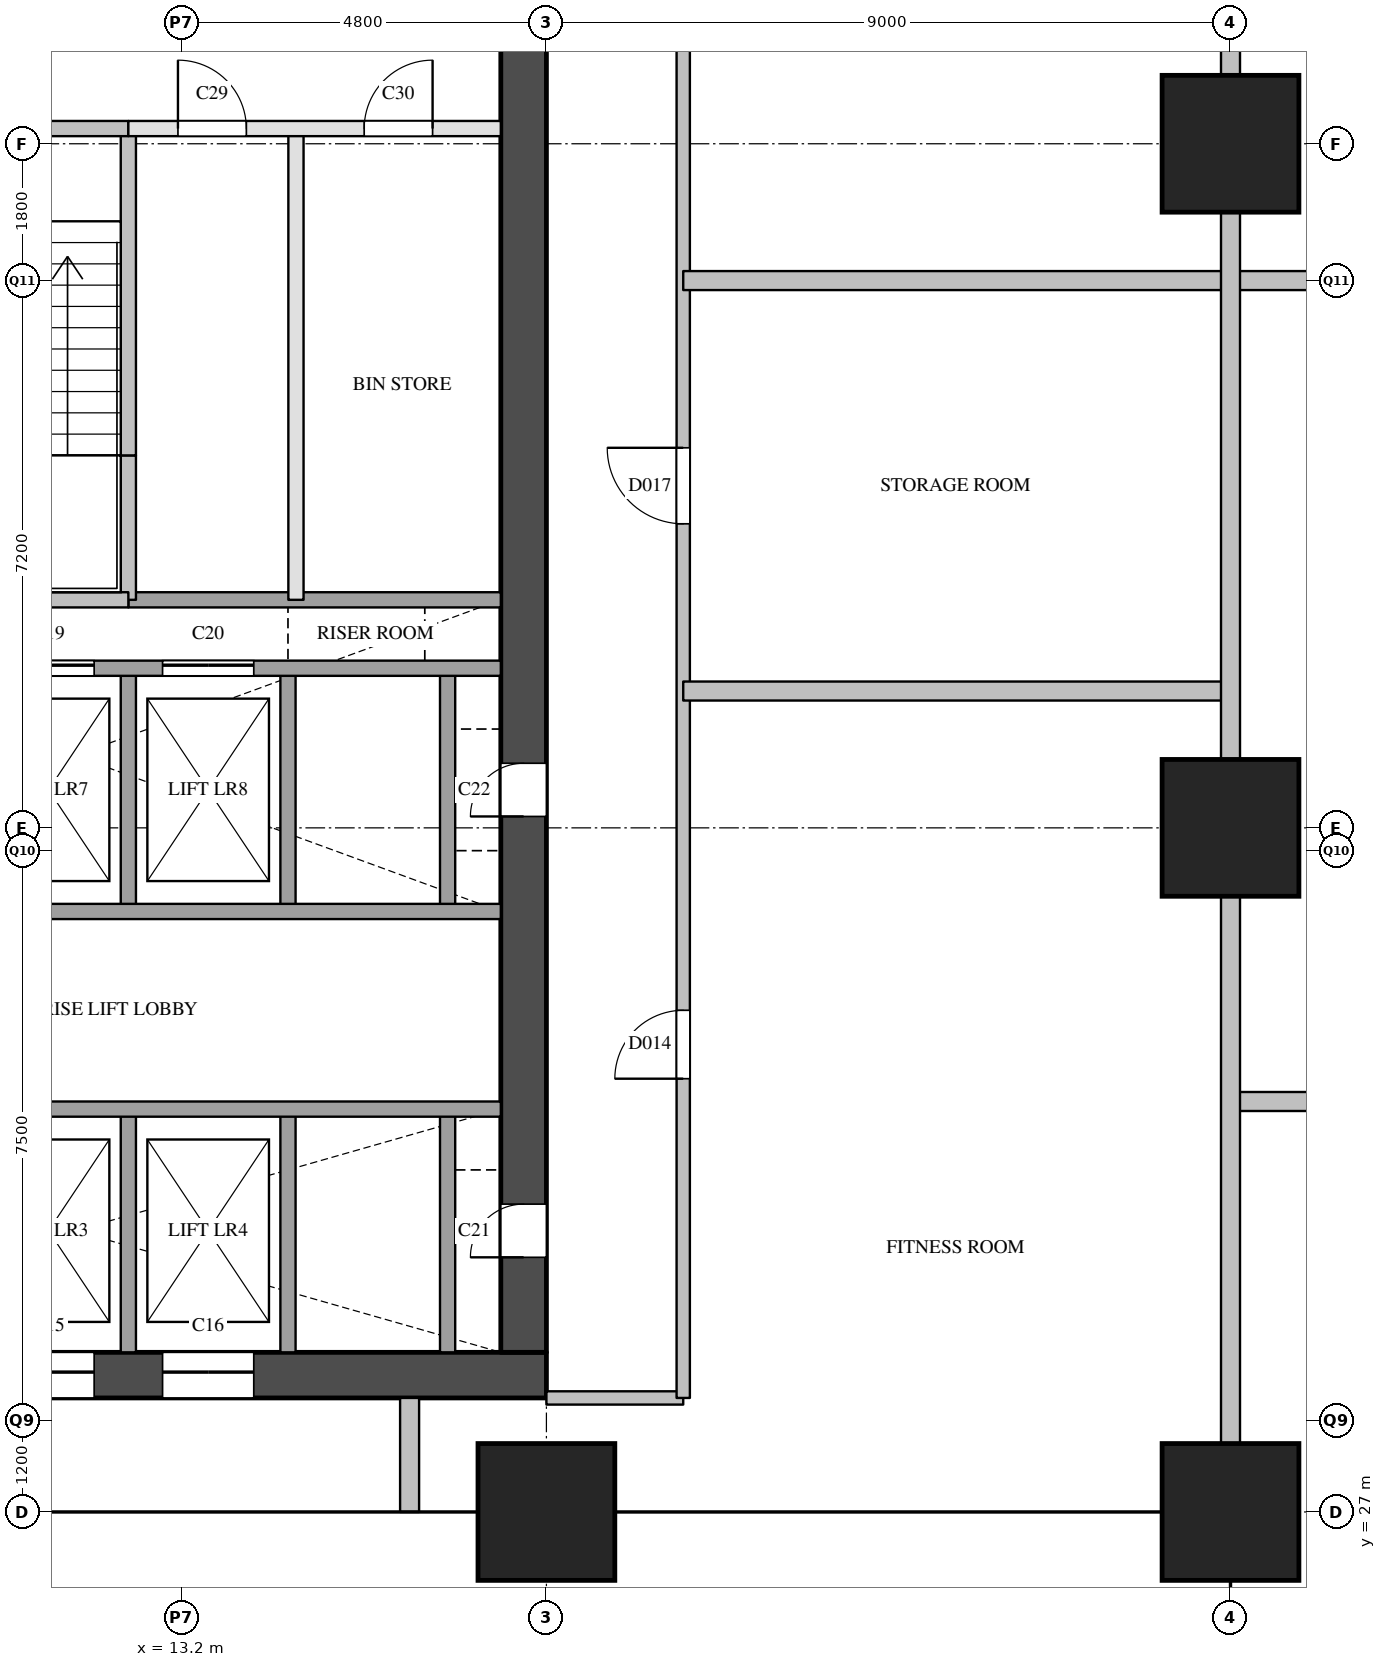
"""IFC4 building model, lengths in metres.
Left out: names, types, materials, properties, quantities, classifications, styles, units other than length and angle.
Written with IfcOpenShell. Run it as: python <this file> out.ifc"""

import sys

from ifc_helpers import new_model, si_unit, direction, frame, frame_2d, origin, origin_2d, place, context, subcontext, project, spatial, rectangle, extrude, element, fill, save


model = new_model("IFC4")
c1 = context("Model", 3, precision=1e-05, world=origin(), true_north=direction((0.0, 1.0)))
c2 = subcontext(c1, "Body", "Model", "MODEL_VIEW")
j1 = project(units=[si_unit("LENGTHUNIT", "METRE"), si_unit("PLANEANGLEUNIT", "RADIAN")], contexts=[c1])
p1 = place(None, origin())
s1 = spatial("IfcSite", under=j1, at=p1, CompositionType="ELEMENT")
p2 = place(p1, origin())
s2 = spatial("IfcBuilding", under=s1, at=p2, CompositionType="ELEMENT")
p3 = place(p2, frame((0.0, 0.0, 89.2)))
s3 = spatial("IfcBuildingStorey", under=s2, at=p3, CompositionType="ELEMENT", Elevation=89.2)
for number, where, z_axis, x_axis in (
    (1, (18.0, 27.0, 0.0), (0.0, 0.0, 1.0), (1.0, 0.0, 0.0)),
    (2, (27.0, 27.0, 0.0), (0.0, 0.0, 1.0), (1.0, 0.0, 0.0)),
    (3, (27.0, 36.0, 0.0), (0.0, 0.0, 1.0), (1.0, 0.0, 0.0)),
    (4, (27.0, 45.0, 0.0), (0.0, 0.0, 1.0), (1.0, 0.0, 0.0)),
):
    element("IfcColumn", number, at=place(p3, frame(where, z_axis=z_axis, x_axis=x_axis)), inside=s3, PredefinedType="COLUMN", context=c2, shape_type="SweptSolid", body=[
        extrude(rectangle(XDim=1.8, YDim=1.8, at=origin_2d()), origin(), (0.0, 0.0, 1.0), 3.8),
    ])
p4 = place(p3, frame((5.6, 28.8, 0.0), z_axis=(0.0, 0.0, 1.0), x_axis=(1.0, 0.0, 0.0)))
e5 = element("IfcWall", 5, at=p4, inside=s3, PredefinedType="SHEAR", context=c2, shape_type="SweptSolid", body=[
    extrude(rectangle(XDim=12.4, YDim=0.6, at=frame_2d((6.2, 0.0))), origin(), (0.0, 0.0, 1.0), 3.5),
])
p5 = place(p4, frame((1.05, 0.0, 0.0)))
e6 = element("IfcOpeningElement", 6, at=p5, cuts=e5, PredefinedType="OPENING", context=c2, shape_type="SweptSolid", body=[
    extrude(rectangle(XDim=1.2, YDim=2.1, at=frame_2d((0.6, 1.05))), frame((0.0, 0.31, 0.0), z_axis=(0.0, -1.0, 0.0), x_axis=(1.0, 0.0, 0.0)), (0.0, 0.0, 1.0), 0.62),
])
p6 = place(p4, frame((5.25, 0.0, 0.0)))
e7 = element("IfcOpeningElement", 7, at=p6, cuts=e5, PredefinedType="OPENING", context=c2, shape_type="SweptSolid", body=[
    extrude(rectangle(XDim=1.2, YDim=2.1, at=frame_2d((0.6, 1.05))), frame((0.0, 0.31, 0.0), z_axis=(0.0, -1.0, 0.0), x_axis=(1.0, 0.0, 0.0)), (0.0, 0.0, 1.0), 0.62),
])
p7 = place(p4, frame((7.35, 0.0, 0.0)))
e8 = element("IfcOpeningElement", 8, at=p7, cuts=e5, PredefinedType="OPENING", context=c2, shape_type="SweptSolid", body=[
    extrude(rectangle(XDim=1.2, YDim=2.1, at=frame_2d((0.6, 1.05))), frame((0.0, 0.31, 0.0), z_axis=(0.0, -1.0, 0.0), x_axis=(1.0, 0.0, 0.0)), (0.0, 0.0, 1.0), 0.62),
])
p8 = place(p3, frame((17.7, 29.1, 0.0), z_axis=(0.0, 0.0, 1.0), x_axis=(0.0, 1.0, 0.0)))
e9 = element("IfcWall", 9, at=p8, inside=s3, PredefinedType="SHEAR", context=c2, shape_type="SweptSolid", body=[
    extrude(rectangle(XDim=20.3, YDim=0.6, at=frame_2d((10.15, 0.0))), origin(), (0.0, 0.0, 1.0), 3.5),
])
p9 = place(p8, frame((1.25, 0.0, 0.0)))
e10 = element("IfcOpeningElement", 10, at=p9, cuts=e9, PredefinedType="OPENING", context=c2, shape_type="SweptSolid", body=[
    extrude(rectangle(XDim=0.7, YDim=2.1, at=frame_2d((0.35, 1.05))), frame((0.0, 0.31, 0.0), z_axis=(0.0, -1.0, 0.0), x_axis=(1.0, 0.0, 0.0)), (0.0, 0.0, 1.0), 0.62),
])
p10 = place(p8, frame((7.05, 0.0, 0.0)))
e11 = element("IfcOpeningElement", 11, at=p10, cuts=e9, PredefinedType="OPENING", context=c2, shape_type="SweptSolid", body=[
    extrude(rectangle(XDim=0.7, YDim=2.1, at=frame_2d((0.35, 1.05))), frame((0.0, 0.31, 0.0), z_axis=(0.0, -1.0, 0.0), x_axis=(1.0, 0.0, 0.0)), (0.0, 0.0, 1.0), 0.62),
])
p11 = place(p3, frame((12.5, 29.1, 0.0), z_axis=(0.0, 0.0, 1.0), x_axis=(0.0, 1.0, 0.0)))
e12 = element("IfcWall", 12, at=p11, inside=s3, PredefinedType="SOLIDWALL", context=c2, shape_type="SweptSolid", body=[
    extrude(rectangle(XDim=3.2, YDim=0.2, at=frame_2d((1.6, 0.0))), origin(), (0.0, 0.0, 1.0), 3.5),
])
p12 = place(p3, frame((12.5, 34.9, 0.0), z_axis=(0.0, 0.0, 1.0), x_axis=(0.0, 1.0, 0.0)))
e13 = element("IfcWall", 13, at=p12, inside=s3, PredefinedType="SOLIDWALL", context=c2, shape_type="SweptSolid", body=[
    extrude(rectangle(XDim=3.2, YDim=0.2, at=frame_2d((1.6, 0.0))), origin(), (0.0, 0.0, 1.0), 3.5),
])
p13 = place(p3, frame((12.5, 39.0, 0.0), z_axis=(0.0, 0.0, 1.0), x_axis=(0.0, 1.0, 0.0)))
e14 = element("IfcWall", 14, at=p13, inside=s3, PredefinedType="SOLIDWALL", context=c2, shape_type="SweptSolid", body=[
    extrude(rectangle(XDim=1.9, YDim=0.2, at=frame_2d((0.95, 0.0))), origin(), (0.0, 0.0, 1.0), 3.5),
])
p14 = place(p3, frame((12.5, 40.9, 0.0), z_axis=(0.0, 0.0, 1.0), x_axis=(0.0, 1.0, 0.0)))
e15 = element("IfcWall", 15, at=p14, inside=s3, PredefinedType="SOLIDWALL", context=c2, shape_type="SweptSolid", body=[
    extrude(rectangle(XDim=4.3, YDim=0.2, at=frame_2d((2.15, 0.0))), origin(), (0.0, 0.0, 1.0), 3.5),
])
p15 = place(p3, frame((14.6, 29.1, 0.0), z_axis=(0.0, 0.0, 1.0), x_axis=(0.0, 1.0, 0.0)))
e16 = element("IfcWall", 16, at=p15, inside=s3, PredefinedType="SOLIDWALL", context=c2, shape_type="SweptSolid", body=[
    extrude(rectangle(XDim=3.2, YDim=0.2, at=frame_2d((1.6, 0.0))), origin(), (0.0, 0.0, 1.0), 3.5),
])
p16 = place(p3, frame((14.6, 34.9, 0.0), z_axis=(0.0, 0.0, 1.0), x_axis=(0.0, 1.0, 0.0)))
e17 = element("IfcWall", 17, at=p16, inside=s3, PredefinedType="SOLIDWALL", context=c2, shape_type="SweptSolid", body=[
    extrude(rectangle(XDim=3.2, YDim=0.2, at=frame_2d((1.6, 0.0))), origin(), (0.0, 0.0, 1.0), 3.5),
])
p17 = place(p3, frame((14.705, 39.0, 0.0), z_axis=(0.0, 0.0, 1.0), x_axis=(0.0, 1.0, 0.0)))
e18 = element("IfcWall", 18, at=p17, inside=s3, PredefinedType="PARTITIONING", context=c2, shape_type="SweptSolid", body=[
    extrude(rectangle(XDim=6.2, YDim=0.2, at=frame_2d((3.1, 0.0))), origin(), (0.0, 0.0, 1.0), 3.5),
])
p18 = place(p3, frame((16.7, 29.1, 0.0), z_axis=(0.0, 0.0, 1.0), x_axis=(0.0, 1.0, 0.0)))
e19 = element("IfcWall", 19, at=p18, inside=s3, PredefinedType="SOLIDWALL", context=c2, shape_type="SweptSolid", body=[
    extrude(rectangle(XDim=3.2, YDim=0.2, at=frame_2d((1.6, 0.0))), origin(), (0.0, 0.0, 1.0), 3.5),
])
p19 = place(p3, frame((16.7, 34.9, 0.0), z_axis=(0.0, 0.0, 1.0), x_axis=(0.0, 1.0, 0.0)))
e20 = element("IfcWall", 20, at=p19, inside=s3, PredefinedType="SOLIDWALL", context=c2, shape_type="SweptSolid", body=[
    extrude(rectangle(XDim=3.2, YDim=0.2, at=frame_2d((1.6, 0.0))), origin(), (0.0, 0.0, 1.0), 3.5),
])
p20 = place(p3, frame((6.2, 32.3, 0.0), z_axis=(0.0, 0.0, 1.0), x_axis=(1.0, 0.0, 0.0)))
e21 = element("IfcWall", 21, at=p20, inside=s3, PredefinedType="SOLIDWALL", context=c2, shape_type="SweptSolid", body=[
    extrude(rectangle(XDim=11.2, YDim=0.2, at=frame_2d((5.6, 0.0))), origin(), (0.0, 0.0, 1.0), 3.5),
])
p21 = place(p20, frame((2.55, 0.0, 0.0)))
e22 = element("IfcOpeningElement", 22, at=p21, cuts=e21, PredefinedType="OPENING", context=c2, shape_type="SweptSolid", body=[
    extrude(rectangle(XDim=1.2, YDim=2.1, at=frame_2d((0.6, 1.05))), frame((0.0, 0.11, 0.0), z_axis=(0.0, -1.0, 0.0), x_axis=(1.0, 0.0, 0.0)), (0.0, 0.0, 1.0), 0.22),
])
p22 = place(p3, frame((6.2, 34.9, 0.0), z_axis=(0.0, 0.0, 1.0), x_axis=(1.0, 0.0, 0.0)))
e23 = element("IfcWall", 23, at=p22, inside=s3, PredefinedType="SOLIDWALL", context=c2, shape_type="SweptSolid", body=[
    extrude(rectangle(XDim=11.2, YDim=0.2, at=frame_2d((5.6, 0.0))), origin(), (0.0, 0.0, 1.0), 3.5),
])
p23 = place(p3, frame((6.2, 38.1, 0.0), z_axis=(0.0, 0.0, 1.0), x_axis=(1.0, 0.0, 0.0)))
e24 = element("IfcWall", 24, at=p23, inside=s3, PredefinedType="SOLIDWALL", context=c2, shape_type="SweptSolid", body=[
    extrude(rectangle(XDim=11.2, YDim=0.2, at=frame_2d((5.6, 0.0))), origin(), (0.0, 0.0, 1.0), 3.5),
])
p24 = place(p23, frame((0.45, 0.0, 0.0)))
e25 = element("IfcOpeningElement", 25, at=p24, cuts=e24, PredefinedType="OPENING", context=c2, shape_type="SweptSolid", body=[
    extrude(rectangle(XDim=1.2, YDim=2.1, at=frame_2d((0.6, 1.05))), frame((0.0, 0.11, 0.0), z_axis=(0.0, -1.0, 0.0), x_axis=(1.0, 0.0, 0.0)), (0.0, 0.0, 1.0), 0.22),
])
p25 = place(p23, frame((2.55, 0.0, 0.0)))
e26 = element("IfcOpeningElement", 26, at=p25, cuts=e24, PredefinedType="OPENING", context=c2, shape_type="SweptSolid", body=[
    extrude(rectangle(XDim=1.2, YDim=2.1, at=frame_2d((0.6, 1.05))), frame((0.0, 0.11, 0.0), z_axis=(0.0, -1.0, 0.0), x_axis=(1.0, 0.0, 0.0)), (0.0, 0.0, 1.0), 0.22),
])
p26 = place(p23, frame((4.65, 0.0, 0.0)))
e27 = element("IfcOpeningElement", 27, at=p26, cuts=e24, PredefinedType="OPENING", context=c2, shape_type="SweptSolid", body=[
    extrude(rectangle(XDim=1.2, YDim=2.1, at=frame_2d((0.6, 1.05))), frame((0.0, 0.11, 0.0), z_axis=(0.0, -1.0, 0.0), x_axis=(1.0, 0.0, 0.0)), (0.0, 0.0, 1.0), 0.22),
])
p27 = place(p23, frame((6.75, 0.0, 0.0)))
e28 = element("IfcOpeningElement", 28, at=p27, cuts=e24, PredefinedType="OPENING", context=c2, shape_type="SweptSolid", body=[
    extrude(rectangle(XDim=1.2, YDim=2.1, at=frame_2d((0.6, 1.05))), frame((0.0, 0.11, 0.0), z_axis=(0.0, -1.0, 0.0), x_axis=(1.0, 0.0, 0.0)), (0.0, 0.0, 1.0), 0.22),
])
p28 = place(p3, frame((12.5, 39.0, 0.0), z_axis=(0.0, 0.0, 1.0), x_axis=(1.0, 0.0, 0.0)))
e29 = element("IfcWall", 29, at=p28, inside=s3, PredefinedType="SOLIDWALL", context=c2, shape_type="SweptSolid", body=[
    extrude(rectangle(XDim=4.9, YDim=0.2, at=frame_2d((2.45, 0.0))), origin(), (0.0, 0.0, 1.0), 3.5),
])
p29 = place(p3, frame((9.45, 39.0, 0.0), z_axis=(0.0, 0.0, 1.0), x_axis=(1.0, 0.0, 0.0)))
e30 = element("IfcWall", 30, at=p29, inside=s3, PredefinedType="SOLIDWALL", context=c2, shape_type="SweptSolid", body=[
    extrude(rectangle(XDim=3.05, YDim=0.2, at=frame_2d((1.525, 0.0))), origin(), (0.0, 0.0, 1.0), 3.5),
])
p30 = place(p3, frame((12.5, 45.2, 0.0), z_axis=(0.0, 0.0, 1.0), x_axis=(1.0, 0.0, 0.0)))
e31 = element("IfcWall", 31, at=p30, inside=s3, PredefinedType="PARTITIONING", context=c2, shape_type="SweptSolid", body=[
    extrude(rectangle(XDim=4.9, YDim=0.2, at=frame_2d((2.45, 0.0))), origin(), (0.0, 0.0, 1.0), 3.5),
])
p31 = place(p30, frame((0.653, 0.0, 0.0)))
e32 = element("IfcOpeningElement", 32, at=p31, cuts=e31, PredefinedType="OPENING", context=c2, shape_type="SweptSolid", body=[
    extrude(rectangle(XDim=0.9, YDim=2.1, at=frame_2d((0.45, 1.05))), frame((0.0, 0.11, 0.0), z_axis=(0.0, -1.0, 0.0), x_axis=(1.0, 0.0, 0.0)), (0.0, 0.0, 1.0), 0.22),
])
p32 = place(p30, frame((3.103, 0.0, 0.0)))
e33 = element("IfcOpeningElement", 33, at=p32, cuts=e31, PredefinedType="OPENING", context=c2, shape_type="SweptSolid", body=[
    extrude(rectangle(XDim=0.9, YDim=2.1, at=frame_2d((0.45, 1.05))), frame((0.0, 0.11, 0.0), z_axis=(0.0, -1.0, 0.0), x_axis=(1.0, 0.0, 0.0)), (0.0, 0.0, 1.0), 0.22),
])
p33 = place(p3, frame((6.2, 45.2, 0.0), z_axis=(0.0, 0.0, 1.0), x_axis=(1.0, 0.0, 0.0)))
e34 = element("IfcWall", 34, at=p33, inside=s3, PredefinedType="SOLIDWALL", context=c2, shape_type="SweptSolid", body=[
    extrude(rectangle(XDim=6.3, YDim=0.2, at=frame_2d((3.15, 0.0))), origin(), (0.0, 0.0, 1.0), 3.5),
])
p34 = place(p33, frame((1.025, 0.0, 0.0)))
e35 = element("IfcOpeningElement", 35, at=p34, cuts=e34, PredefinedType="OPENING", context=c2, shape_type="SweptSolid", body=[
    extrude(rectangle(XDim=1.1, YDim=2.1, at=frame_2d((0.55, 1.05))), frame((0.0, 0.11, 0.0), z_axis=(0.0, -1.0, 0.0), x_axis=(1.0, 0.0, 0.0)), (0.0, 0.0, 1.0), 0.22),
])
p35 = place(p33, frame((4.175, 0.0, 0.0)))
e36 = element("IfcOpeningElement", 36, at=p35, cuts=e34, PredefinedType="OPENING", context=c2, shape_type="SweptSolid", body=[
    extrude(rectangle(XDim=1.1, YDim=2.1, at=frame_2d((0.55, 1.05))), frame((0.0, 0.11, 0.0), z_axis=(0.0, -1.0, 0.0), x_axis=(1.0, 0.0, 0.0)), (0.0, 0.0, 1.0), 0.22),
])
p36 = place(p3, frame((18.0, 28.5, 0.0), z_axis=(0.0, 0.0, 1.0), x_axis=(1.0, 0.0, 0.0)))
e37 = element("IfcWall", 37, at=p36, inside=s3, PredefinedType="PARTITIONING", context=c2, shape_type="SweptSolid", body=[
    extrude(rectangle(XDim=1.8, YDim=0.175, at=frame_2d((0.9, 0.0))), origin(), (0.0, 0.0, 1.0), 3.5),
])
p37 = place(p3, frame((19.8, 28.5, 0.0), z_axis=(0.0, 0.0, 1.0), x_axis=(0.0, 1.0, 0.0)))
e38 = element("IfcWall", 38, at=p37, inside=s3, PredefinedType="PARTITIONING", context=c2, shape_type="SweptSolid", body=[
    extrude(rectangle(XDim=23.3, YDim=0.175, at=frame_2d((11.65, 0.0))), origin(), (0.0, 0.0, 1.0), 3.5),
])
p38 = place(p37, frame((4.2, 0.0, 0.0)))
e39 = element("IfcOpeningElement", 39, at=p38, cuts=e38, PredefinedType="OPENING", context=c2, shape_type="SweptSolid", body=[
    extrude(rectangle(XDim=0.9, YDim=2.1, at=frame_2d((0.45, 1.05))), frame((0.0, 0.097, 0.0), z_axis=(0.0, -1.0, 0.0), x_axis=(1.0, 0.0, 0.0)), (0.0, 0.0, 1.0), 0.195),
])
p39 = place(p37, frame((11.5, 0.0, 0.0)))
e40 = element("IfcOpeningElement", 40, at=p39, cuts=e38, PredefinedType="OPENING", context=c2, shape_type="SweptSolid", body=[
    extrude(rectangle(XDim=1.0, YDim=2.1, at=frame_2d((0.5, 1.05))), frame((0.0, 0.097, 0.0), z_axis=(0.0, -1.0, 0.0), x_axis=(1.0, 0.0, 0.0)), (0.0, 0.0, 1.0), 0.195),
])
p40 = place(p37, frame((18.55, 0.0, 0.0)))
e41 = element("IfcOpeningElement", 41, at=p40, cuts=e38, PredefinedType="OPENING", context=c2, shape_type="SweptSolid", body=[
    extrude(rectangle(XDim=0.9, YDim=2.1, at=frame_2d((0.45, 1.05))), frame((0.0, 0.097, 0.0), z_axis=(0.0, -1.0, 0.0), x_axis=(1.0, 0.0, 0.0)), (0.0, 0.0, 1.0), 0.195),
])
for number, where, z_axis, x_axis in (
    (42, (27.0, 32.4, 0.0), (0.0, 0.0, 1.0), (1.0, 0.0, 0.0)),
    (43, (19.8, 37.8, 0.0), (0.0, 0.0, 1.0), (1.0, 0.0, 0.0)),
):
    element("IfcWall", number, at=place(p3, frame(where, z_axis=z_axis, x_axis=x_axis)), inside=s3, PredefinedType="PARTITIONING", context=c2, shape_type="SweptSolid", body=[
        extrude(rectangle(XDim=7.2, YDim=0.25, at=frame_2d((3.6, 0.0))), origin(), (0.0, 0.0, 1.0), 2.5),
    ])
p41 = place(p3, frame((19.8, 43.2, 0.0), z_axis=(0.0, 0.0, 1.0), x_axis=(1.0, 0.0, 0.0)))
e44 = element("IfcWall", 44, at=p41, inside=s3, PredefinedType="PARTITIONING", context=c2, shape_type="SweptSolid", body=[
    extrude(rectangle(XDim=14.4, YDim=0.25, at=frame_2d((7.2, 0.0))), origin(), (0.0, 0.0, 1.0), 2.5),
])
p42 = place(p3, frame((16.2, 27.0, 0.0), z_axis=(0.0, 0.0, 1.0), x_axis=(0.0, 1.0, 0.0)))
e45 = element("IfcWall", 45, at=p42, inside=s3, PredefinedType="PARTITIONING", context=c2, shape_type="SweptSolid", body=[
    extrude(rectangle(XDim=1.5, YDim=0.25, at=frame_2d((0.75, 0.0))), origin(), (0.0, 0.0, 1.0), 2.5),
])
p43 = place(p3, frame((27.0, 27.0, 0.0), z_axis=(0.0, 0.0, 1.0), x_axis=(0.0, 1.0, 0.0)))
e46 = element("IfcWall", 46, at=p43, inside=s3, PredefinedType="PARTITIONING", context=c2, shape_type="SweptSolid", body=[
    extrude(rectangle(XDim=27.0, YDim=0.25, at=frame_2d((13.5, 0.0))), origin(), (0.0, 0.0, 1.0), 2.5),
])
p44 = place(p6, origin())
e47 = element("IfcDoor", 47, at=p44, inside=s3, OperationType="SLIDING_TO_LEFT", PredefinedType="DOOR", context=c2, shape_type="SweptSolid", body=[
    extrude(rectangle(XDim=1.2, YDim=2.1, at=frame_2d((0.6, 1.05))), frame((0.0, 0.025, 0.0), z_axis=(0.0, -1.0, 0.0), x_axis=(1.0, 0.0, 0.0)), (0.0, 0.0, 1.0), 0.05),
])
fill(e7, e47)
p45 = place(p7, origin())
e48 = element("IfcDoor", 48, at=p45, inside=s3, OperationType="SLIDING_TO_LEFT", PredefinedType="DOOR", context=c2, shape_type="SweptSolid", body=[
    extrude(rectangle(XDim=1.2, YDim=2.1, at=frame_2d((0.6, 1.05))), frame((0.0, 0.025, 0.0), z_axis=(0.0, -1.0, 0.0), x_axis=(1.0, 0.0, 0.0)), (0.0, 0.0, 1.0), 0.05),
])
fill(e8, e48)
p46 = place(p26, origin())
e49 = element("IfcDoor", 49, at=p46, inside=s3, OperationType="SLIDING_TO_LEFT", PredefinedType="DOOR", context=c2, shape_type="SweptSolid", body=[
    extrude(rectangle(XDim=1.2, YDim=2.1, at=frame_2d((0.6, 1.05))), frame((0.0, 0.025, 0.0), z_axis=(0.0, -1.0, 0.0), x_axis=(1.0, 0.0, 0.0)), (0.0, 0.0, 1.0), 0.05),
])
fill(e27, e49)
p47 = place(p27, origin())
e50 = element("IfcDoor", 50, at=p47, inside=s3, OperationType="SLIDING_TO_LEFT", PredefinedType="DOOR", context=c2, shape_type="SweptSolid", body=[
    extrude(rectangle(XDim=1.2, YDim=2.1, at=frame_2d((0.6, 1.05))), frame((0.0, 0.025, 0.0), z_axis=(0.0, -1.0, 0.0), x_axis=(1.0, 0.0, 0.0)), (0.0, 0.0, 1.0), 0.05),
])
fill(e28, e50)
p48 = place(p9, origin())
e51 = element("IfcDoor", 51, at=p48, inside=s3, OperationType="SINGLE_SWING_LEFT", PredefinedType="DOOR", context=c2, shape_type="SweptSolid", body=[
    extrude(rectangle(XDim=0.7, YDim=2.1, at=frame_2d((0.35, 1.05))), frame((0.0, 0.025, 0.0), z_axis=(0.0, -1.0, 0.0), x_axis=(1.0, 0.0, 0.0)), (0.0, 0.0, 1.0), 0.05),
])
fill(e10, e51)
p49 = place(p10, origin())
e52 = element("IfcDoor", 52, at=p49, inside=s3, OperationType="SINGLE_SWING_LEFT", PredefinedType="DOOR", context=c2, shape_type="SweptSolid", body=[
    extrude(rectangle(XDim=0.7, YDim=2.1, at=frame_2d((0.35, 1.05))), frame((0.0, 0.025, 0.0), z_axis=(0.0, -1.0, 0.0), x_axis=(1.0, 0.0, 0.0)), (0.0, 0.0, 1.0), 0.05),
])
fill(e11, e52)
p50 = place(p31, origin())
e53 = element("IfcDoor", 53, at=p50, inside=s3, OperationType="SINGLE_SWING_LEFT", PredefinedType="DOOR", context=c2, shape_type="SweptSolid", body=[
    extrude(rectangle(XDim=0.9, YDim=2.1, at=frame_2d((0.45, 1.05))), frame((0.0, 0.025, 0.0), z_axis=(0.0, -1.0, 0.0), x_axis=(1.0, 0.0, 0.0)), (0.0, 0.0, 1.0), 0.05),
])
fill(e32, e53)
p51 = place(p32, origin())
e54 = element("IfcDoor", 54, at=p51, inside=s3, OperationType="SINGLE_SWING_RIGHT", PredefinedType="DOOR", context=c2, shape_type="SweptSolid", body=[
    extrude(rectangle(XDim=0.9, YDim=2.1, at=frame_2d((0.45, 1.05))), frame((0.0, 0.025, 0.0), z_axis=(0.0, -1.0, 0.0), x_axis=(1.0, 0.0, 0.0)), (0.0, 0.0, 1.0), 0.05),
])
fill(e33, e54)
p52 = place(p38, origin())
e55 = element("IfcDoor", 55, at=p52, inside=s3, OperationType="SINGLE_SWING_LEFT", PredefinedType="DOOR", context=c2, shape_type="SweptSolid", body=[
    extrude(rectangle(XDim=0.9, YDim=2.1, at=frame_2d((0.45, 1.05))), frame((0.0, 0.025, 0.0), z_axis=(0.0, -1.0, 0.0), x_axis=(1.0, 0.0, 0.0)), (0.0, 0.0, 1.0), 0.05),
])
fill(e39, e55)
p53 = place(p39, origin())
e56 = element("IfcDoor", 56, at=p53, inside=s3, OperationType="SINGLE_SWING_RIGHT", PredefinedType="DOOR", context=c2, shape_type="SweptSolid", body=[
    extrude(rectangle(XDim=1.0, YDim=2.1, at=frame_2d((0.5, 1.05))), frame((0.0, 0.025, 0.0), z_axis=(0.0, -1.0, 0.0), x_axis=(1.0, 0.0, 0.0)), (0.0, 0.0, 1.0), 0.05),
])
fill(e40, e56)
save(model, sys.argv[1])
